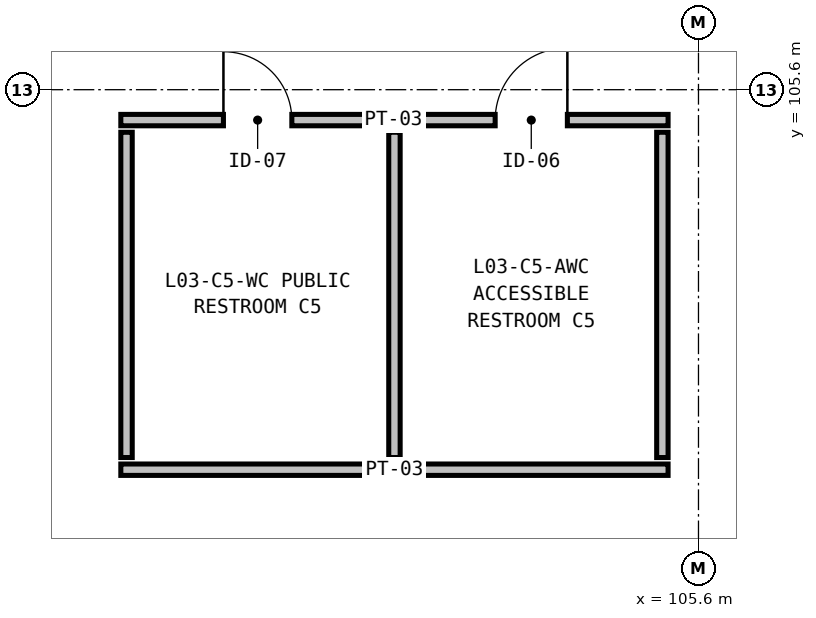
"""IFC4 building model, lengths in metres.
Left out: names, types, materials, properties, quantities, classifications, styles, units other than length and angle.
Written with IfcOpenShell. Run it as: python <this file> out.ifc"""

import sys

from ifc_helpers import new_model, si_unit, direction, frame, frame_2d, origin, place, context, subcontext, project, spatial, rectangle, extrude, element, fill, save


model = new_model("IFC4")
c1 = context("Model", 3, precision=1e-05, world=origin(), true_north=direction((0.0, 1.0)))
c2 = subcontext(c1, "Body", "Model", "MODEL_VIEW")
j1 = project(units=[si_unit("LENGTHUNIT", "METRE"), si_unit("PLANEANGLEUNIT", "RADIAN")], contexts=[c1])
p1 = place(None, origin())
s1 = spatial("IfcSite", under=j1, at=p1, CompositionType="ELEMENT")
p2 = place(p1, origin())
s2 = spatial("IfcBuilding", under=s1, at=p2, CompositionType="ELEMENT")
p3 = place(p2, frame((0.0, 0.0, 16.8)))
s3 = spatial("IfcBuildingStorey", under=s2, at=p3, CompositionType="ELEMENT", Elevation=16.8)
p4 = place(p3, frame((98.0, 105.2, 0.0), z_axis=(0.0, 0.0, 1.0), x_axis=(1.0, 0.0, 0.0)))
e1 = element("IfcWall", 1, at=p4, inside=s3, PredefinedType="PARTITIONING", context=c2, shape_type="SweptSolid", body=[
    extrude(rectangle(XDim=7.2, YDim=0.15, at=frame_2d((3.6, 0.0))), origin(), (0.0, 0.0, 1.0), 5.1),
])
p5 = place(p4, frame((1.35, 0.0, 0.0)))
e2 = element("IfcOpeningElement", 2, at=p5, cuts=e1, PredefinedType="OPENING", context=c2, shape_type="SweptSolid", body=[
    extrude(rectangle(XDim=0.9, YDim=2.1, at=frame_2d((0.45, 1.05))), frame((0.0, 0.085, 0.0), z_axis=(0.0, -1.0, 0.0), x_axis=(1.0, 0.0, 0.0)), (0.0, 0.0, 1.0), 0.17),
])
p6 = place(p4, frame((4.925, 0.0, 0.0)))
e3 = element("IfcOpeningElement", 3, at=p6, cuts=e1, PredefinedType="OPENING", context=c2, shape_type="SweptSolid", body=[
    extrude(rectangle(XDim=0.95, YDim=2.15, at=frame_2d((0.475, 1.075))), frame((0.0, 0.085, 0.0), z_axis=(0.0, -1.0, 0.0), x_axis=(1.0, 0.0, 0.0)), (0.0, 0.0, 1.0), 0.17),
])
p7 = place(p3, frame((98.0, 100.6, 0.0), z_axis=(0.0, 0.0, 1.0), x_axis=(1.0, 0.0, 0.0)))
e4 = element("IfcWall", 4, at=p7, inside=s3, PredefinedType="PARTITIONING", context=c2, shape_type="SweptSolid", body=[
    extrude(rectangle(XDim=7.2, YDim=0.15, at=frame_2d((3.6, 0.0))), origin(), (0.0, 0.0, 1.0), 5.1),
])
for number, where, z_axis, x_axis in (
    (5, (98.075, 100.76, 0.0), (0.0, 0.0, 1.0), (0.0, 1.0, 0.0)),
    (6, (101.6, 100.76, 0.0), (0.0, 0.0, 1.0), (0.0, 1.0, 0.0)),
    (7, (105.125, 100.76, 0.0), (0.0, 0.0, 1.0), (0.0, 1.0, 0.0)),
):
    element("IfcWall", number, at=place(p3, frame(where, z_axis=z_axis, x_axis=x_axis)), inside=s3, PredefinedType="PARTITIONING", context=c2, shape_type="SweptSolid", body=[
        extrude(rectangle(XDim=4.28, YDim=0.15, at=frame_2d((2.14, 0.0))), origin(), (0.0, 0.0, 1.0), 5.1),
    ])
p8 = place(p5, origin())
e8 = element("IfcDoor", 8, at=p8, inside=s3, OperationType="SINGLE_SWING_LEFT", PredefinedType="DOOR", context=c2, shape_type="SweptSolid", body=[
    extrude(rectangle(XDim=0.9, YDim=2.1, at=frame_2d((0.45, 1.05))), frame((0.0, 0.025, 0.0), z_axis=(0.0, -1.0, 0.0), x_axis=(1.0, 0.0, 0.0)), (0.0, 0.0, 1.0), 0.05),
])
fill(e2, e8)
p9 = place(p6, origin())
e9 = element("IfcDoor", 9, at=p9, inside=s3, OperationType="SINGLE_SWING_RIGHT", PredefinedType="DOOR", context=c2, shape_type="SweptSolid", body=[
    extrude(rectangle(XDim=0.95, YDim=2.15, at=frame_2d((0.475, 1.075))), frame((0.0, 0.025, 0.0), z_axis=(0.0, -1.0, 0.0), x_axis=(1.0, 0.0, 0.0)), (0.0, 0.0, 1.0), 0.05),
])
fill(e3, e9)
save(model, sys.argv[1])
